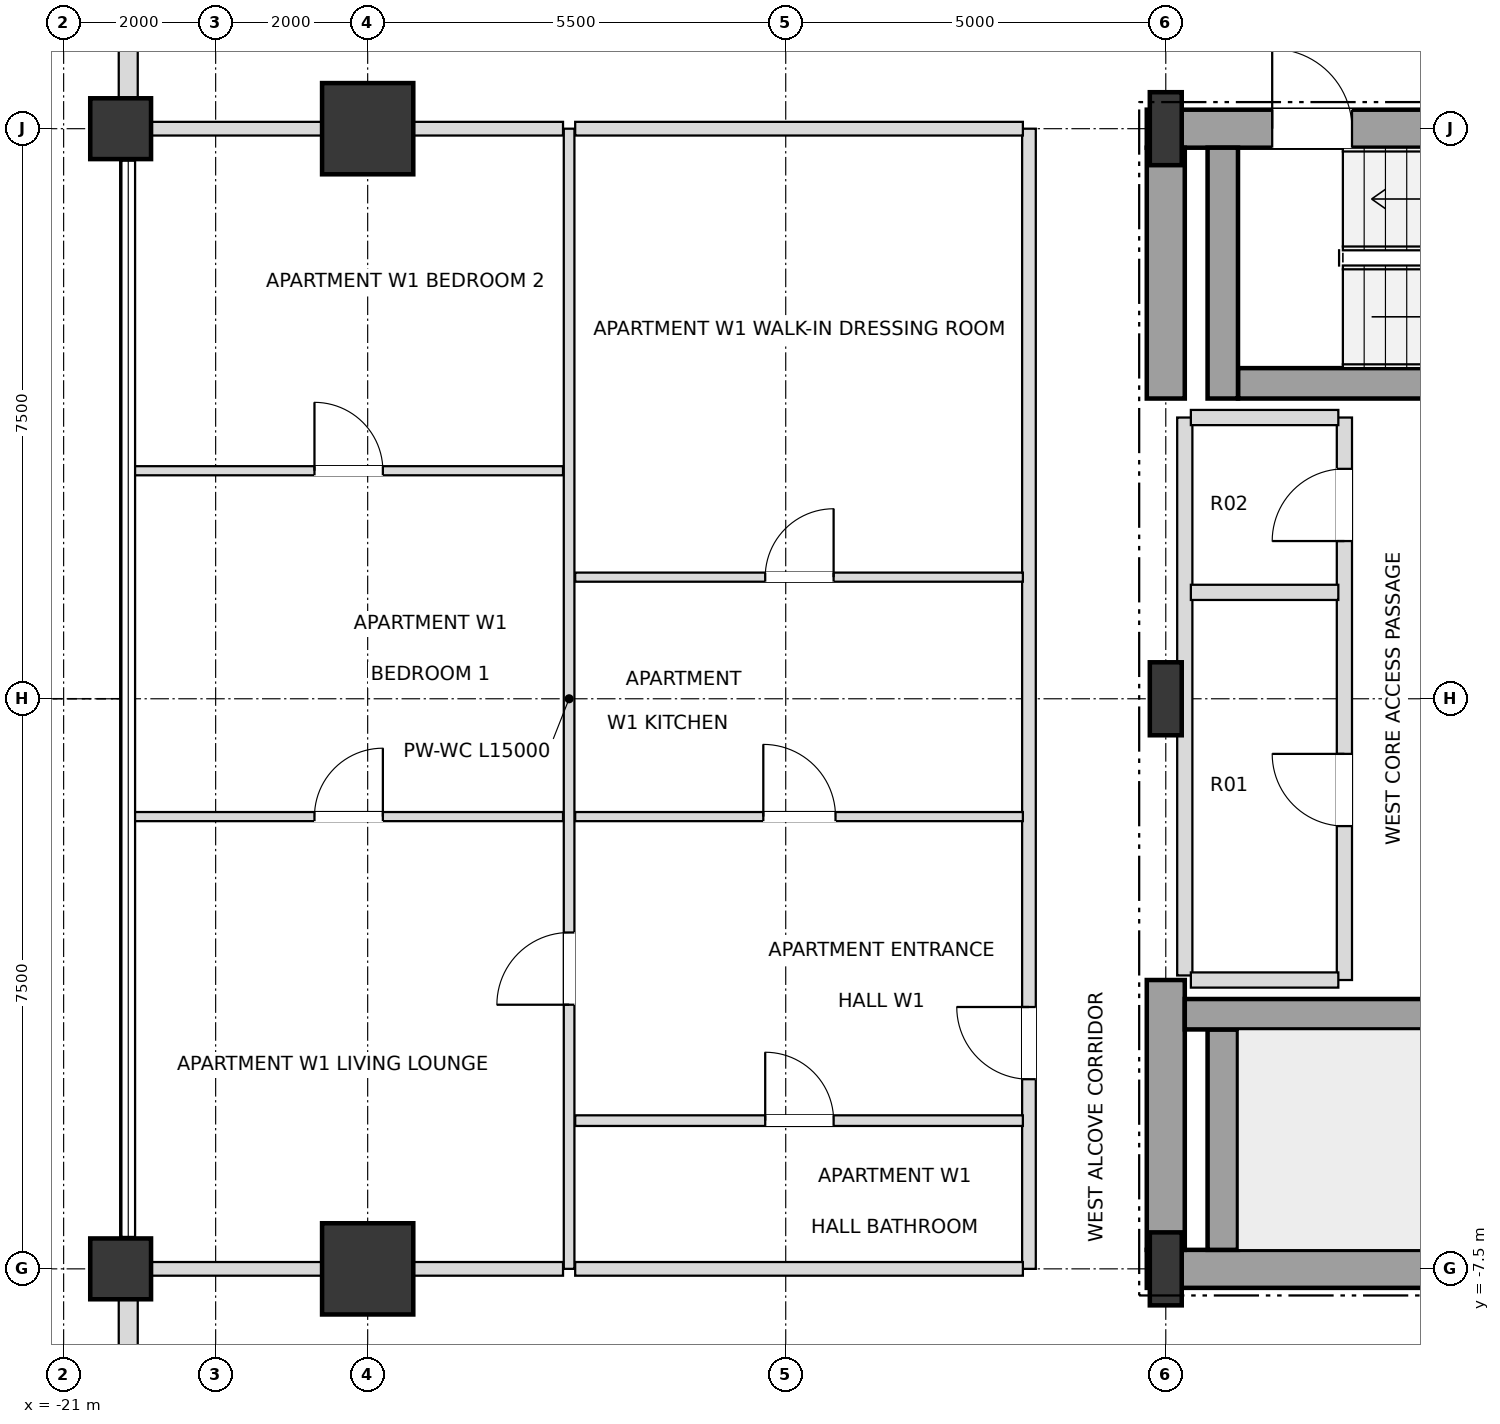
"""IFC4 building model, lengths in metres.
Left out: names, types, materials, properties, quantities, classifications, styles, units other than length and angle.
Written with IfcOpenShell. Run it as: python <this file> out.ifc"""

import sys

from ifc_helpers import new_model, si_unit, direction, frame, frame_2d, origin, origin_2d, place, context, subcontext, project, spatial, rectangle, i_section, extrude, element, fill, save


model = new_model("IFC4")
c1 = context("Model", 3, precision=1e-05, world=origin(), true_north=direction((0.0, 1.0)))
c2 = subcontext(c1, "Body", "Model", "MODEL_VIEW")
j1 = project(units=[si_unit("LENGTHUNIT", "METRE"), si_unit("PLANEANGLEUNIT", "RADIAN")], contexts=[c1])
p1 = place(None, origin())
s1 = spatial("IfcSite", under=j1, at=p1, CompositionType="ELEMENT")
p2 = place(p1, origin())
s2 = spatial("IfcBuilding", under=s1, at=p2, CompositionType="ELEMENT")
p3 = place(p2, frame((0.0, 0.0, 133.2)))
s3 = spatial("IfcBuildingStorey", under=s2, at=p3, CompositionType="ELEMENT", Elevation=133.2)
for number, where, z_axis, x_axis in (
    (1, (-6.5, -7.5, 0.0), (0.0, 0.0, 1.0), (1.0, 0.0, 0.0)),
    (2, (-6.5, 0.0, 0.0), (0.0, 0.0, 1.0), (1.0, 0.0, 0.0)),
    (3, (-6.5, 7.5, 0.0), (0.0, 0.0, 1.0), (1.0, 0.0, 0.0)),
):
    element("IfcColumn", number, at=place(p3, frame(where, z_axis=z_axis, x_axis=x_axis)), inside=s3, PredefinedType="COLUMN", context=c2, shape_type="SweptSolid", body=[
        extrude(i_section(OverallWidth=0.42, OverallDepth=0.96, WebThickness=0.022, FlangeThickness=0.034, at=origin_2d()), origin(), (0.0, 0.0, 1.0), 3.6),
    ])
for number, where, z_axis, x_axis in (
    (4, (-17.0, 7.5, 0.0), (0.0, 0.0, 1.0), (1.0, 0.0, 0.0)),
    (5, (-17.0, -7.5, 0.0), (0.0, 0.0, 1.0), (1.0, 0.0, 0.0)),
):
    element("IfcColumn", number, at=place(p3, frame(where, z_axis=z_axis, x_axis=x_axis)), inside=s3, PredefinedType="USERDEFINED", context=c2, shape_type="SweptSolid", body=[
        extrude(rectangle(XDim=1.2, YDim=1.2, at=origin_2d()), origin(), (0.0, 0.0, 1.0), 3.6),
    ])
for number, where, z_axis, x_axis in (
    (6, (-20.25, -7.5, 0.0), (0.0, 0.0, 1.0), (1.0, 0.0, 0.0)),
    (7, (-20.25, 7.5, 0.0), (0.0, 0.0, 1.0), (1.0, 0.0, 0.0)),
):
    element("IfcColumn", number, at=place(p3, frame(where, z_axis=z_axis, x_axis=x_axis)), inside=s3, PredefinedType="COLUMN", context=c2, shape_type="SweptSolid", body=[
        extrude(rectangle(XDim=0.8, YDim=0.8, at=origin_2d()), origin(), (0.0, 0.0, 1.0), 3.6),
    ])
p4 = place(p3, frame((-20.15, 12.605, 0.0), z_axis=(0.0, 0.0, 1.0), x_axis=(0.0, -1.0, 0.0)))
e8 = element("IfcWall", 8, at=p4, inside=s3, PredefinedType="SOLIDWALL", context=c2, shape_type="SweptSolid", body=[
    extrude(rectangle(XDim=4.71, YDim=0.25, at=frame_2d((2.355, 0.0))), origin(), (0.0, 0.0, 1.0), 2.736),
])
p5 = place(p4, frame((1.455, 0.0, 0.72)))
e9 = element("IfcOpeningElement", 9, at=p5, cuts=e8, PredefinedType="OPENING", context=c2, shape_type="SweptSolid", body=[
    extrude(rectangle(XDim=1.8, YDim=1.68, at=frame_2d((0.9, 0.84))), frame((0.0, 0.135, 0.0), z_axis=(0.0, -1.0, 0.0), x_axis=(1.0, 0.0, 0.0)), (0.0, 0.0, 1.0), 0.27),
])
p6 = place(p3, frame((-20.15, -7.895, 0.0), z_axis=(0.0, 0.0, 1.0), x_axis=(0.0, -1.0, 0.0)))
e10 = element("IfcWall", 10, at=p6, inside=s3, PredefinedType="SOLIDWALL", context=c2, shape_type="SweptSolid", body=[
    extrude(rectangle(XDim=4.71, YDim=0.25, at=frame_2d((2.355, 0.0))), origin(), (0.0, 0.0, 1.0), 2.736),
])
p7 = place(p6, frame((1.455, 0.0, 0.72)))
e11 = element("IfcOpeningElement", 11, at=p7, cuts=e10, PredefinedType="OPENING", context=c2, shape_type="SweptSolid", body=[
    extrude(rectangle(XDim=1.8, YDim=1.68, at=frame_2d((0.9, 0.84))), frame((0.0, 0.135, 0.0), z_axis=(0.0, -1.0, 0.0), x_axis=(1.0, 0.0, 0.0)), (0.0, 0.0, 1.0), 0.27),
])
p8 = place(p3, frame((-6.75, -7.5, 0.0), z_axis=(0.0, 0.0, 1.0), x_axis=(1.0, 0.0, 0.0)))
e12 = element("IfcWall", 12, at=p8, inside=s3, PredefinedType="SHEAR", context=c2, shape_type="SweptSolid", body=[
    extrude(rectangle(XDim=6.75, YDim=0.5, at=frame_2d((3.375, 0.0))), origin(), (0.0, 0.0, 1.0), 3.38),
])
p9 = place(p3, frame((-6.75, 7.5, 0.0), z_axis=(0.0, 0.0, 1.0), x_axis=(1.0, 0.0, 0.0)))
e13 = element("IfcWall", 13, at=p9, inside=s3, PredefinedType="SHEAR", context=c2, shape_type="SweptSolid", body=[
    extrude(rectangle(XDim=6.75, YDim=0.5, at=frame_2d((3.375, 0.0))), origin(), (0.0, 0.0, 1.0), 3.38),
])
p10 = place(p9, frame((1.65, 0.0, 0.0)))
e14 = element("IfcOpeningElement", 14, at=p10, cuts=e13, PredefinedType="OPENING", context=c2, shape_type="SweptSolid", body=[
    extrude(rectangle(XDim=1.05, YDim=2.15, at=frame_2d((0.525, 1.075))), frame((0.0, 0.26, 0.0), z_axis=(0.0, -1.0, 0.0), x_axis=(1.0, 0.0, 0.0)), (0.0, 0.0, 1.0), 0.52),
])
p11 = place(p3, frame((-6.5, -7.25, 0.0), z_axis=(0.0, 0.0, 1.0), x_axis=(0.0, 1.0, 0.0)))
e15 = element("IfcWall", 15, at=p11, inside=s3, PredefinedType="SHEAR", context=c2, shape_type="SweptSolid", body=[
    extrude(rectangle(XDim=3.55, YDim=0.5, at=frame_2d((1.775, 0.0))), origin(), (0.0, 0.0, 1.0), 3.38),
])
p12 = place(p3, frame((-6.5, 3.95, 0.0), z_axis=(0.0, 0.0, 1.0), x_axis=(0.0, 1.0, 0.0)))
e16 = element("IfcWall", 16, at=p12, inside=s3, PredefinedType="SHEAR", context=c2, shape_type="SweptSolid", body=[
    extrude(rectangle(XDim=3.3, YDim=0.5, at=frame_2d((1.65, 0.0))), origin(), (0.0, 0.0, 1.0), 3.38),
])
p13 = place(p3, frame((-5.75, -7.25, 0.0), z_axis=(0.0, 0.0, 1.0), x_axis=(0.0, 1.0, 0.0)))
e17 = element("IfcWall", 17, at=p13, inside=s3, PredefinedType="SHEAR", context=c2, shape_type="SweptSolid", body=[
    extrude(rectangle(XDim=2.9, YDim=0.4, at=frame_2d((1.45, 0.0))), origin(), (0.0, 0.0, 1.0), 3.38),
])
p14 = place(p3, frame((-6.25, -4.15, 0.0), z_axis=(0.0, 0.0, 1.0), x_axis=(1.0, 0.0, 0.0)))
e18 = element("IfcWall", 18, at=p14, inside=s3, PredefinedType="SHEAR", context=c2, shape_type="SweptSolid", body=[
    extrude(rectangle(XDim=7.78, YDim=0.4, at=frame_2d((3.89, 0.0))), origin(), (0.0, 0.0, 1.0), 3.38),
])
p15 = place(p3, frame((-5.55, 4.15, 0.0), z_axis=(0.0, 0.0, 1.0), x_axis=(1.0, 0.0, 0.0)))
e19 = element("IfcWall", 19, at=p15, inside=s3, PredefinedType="SHEAR", context=c2, shape_type="SweptSolid", body=[
    extrude(rectangle(XDim=7.08, YDim=0.4, at=frame_2d((3.54, 0.0))), origin(), (0.0, 0.0, 1.0), 3.38),
])
p16 = place(p3, frame((-5.75, 3.95, 0.0), z_axis=(0.0, 0.0, 1.0), x_axis=(0.0, 1.0, 0.0)))
e20 = element("IfcWall", 20, at=p16, inside=s3, PredefinedType="SHEAR", context=c2, shape_type="SweptSolid", body=[
    extrude(rectangle(XDim=3.3, YDim=0.4, at=frame_2d((1.65, 0.0))), origin(), (0.0, 0.0, 1.0), 3.38),
])
p17 = place(p3, frame((-14.35, -7.5, 0.0), z_axis=(0.0, 0.0, 1.0), x_axis=(0.0, 1.0, 0.0)))
e21 = element("IfcWall", 21, at=p17, inside=s3, PredefinedType="PARTITIONING", context=c2, shape_type="SweptSolid", body=[
    extrude(rectangle(XDim=15.0, YDim=0.14, at=frame_2d((7.5, 0.0))), origin(), (0.0, 0.0, 1.0), 3.38),
])
p18 = place(p17, frame((3.475, 0.0, 0.0)))
e22 = element("IfcOpeningElement", 22, at=p18, cuts=e21, PredefinedType="OPENING", context=c2, shape_type="SweptSolid", body=[
    extrude(rectangle(XDim=0.95, YDim=2.1, at=frame_2d((0.475, 1.05))), frame((0.0, 0.08, 0.0), z_axis=(0.0, -1.0, 0.0), x_axis=(1.0, 0.0, 0.0)), (0.0, 0.0, 1.0), 0.16),
])
p19 = place(p3, frame((-8.3, -7.5, 0.0), z_axis=(0.0, 0.0, 1.0), x_axis=(0.0, 1.0, 0.0)))
e23 = element("IfcWall", 23, at=p19, inside=s3, PredefinedType="PARTITIONING", context=c2, shape_type="SweptSolid", body=[
    extrude(rectangle(XDim=15.0, YDim=0.18, at=frame_2d((7.5, 0.0))), origin(), (0.0, 0.0, 1.0), 3.38),
])
p20 = place(p19, frame((2.495, 0.0, 0.0)))
e24 = element("IfcOpeningElement", 24, at=p20, cuts=e23, PredefinedType="OPENING", context=c2, shape_type="SweptSolid", body=[
    extrude(rectangle(XDim=0.95, YDim=2.15, at=frame_2d((0.475, 1.075))), frame((0.0, 0.1, 0.0), z_axis=(0.0, -1.0, 0.0), x_axis=(1.0, 0.0, 0.0)), (0.0, 0.0, 1.0), 0.2),
])
p21 = place(p3, frame((-6.25, -3.64, 0.0), z_axis=(0.0, 0.0, 1.0), x_axis=(0.0, 1.0, 0.0)))
e25 = element("IfcWall", 25, at=p21, inside=s3, PredefinedType="SOLIDWALL", context=c2, shape_type="SweptSolid", body=[
    extrude(rectangle(XDim=7.34, YDim=0.2, at=frame_2d((3.67, 0.0))), origin(), (0.0, 0.0, 1.0), 3.38),
])
p22 = place(p3, frame((-4.15, -3.7, 0.0), z_axis=(0.0, 0.0, 1.0), x_axis=(0.0, 1.0, 0.0)))
e26 = element("IfcWall", 26, at=p22, inside=s3, PredefinedType="SOLIDWALL", context=c2, shape_type="SweptSolid", body=[
    extrude(rectangle(XDim=7.4, YDim=0.2, at=frame_2d((3.7, 0.0))), origin(), (0.0, 0.0, 1.0), 3.38),
])
p23 = place(p22, frame((2.025, 0.0, 0.0)))
e27 = element("IfcOpeningElement", 27, at=p23, cuts=e26, PredefinedType="OPENING", context=c2, shape_type="SweptSolid", body=[
    extrude(rectangle(XDim=0.95, YDim=2.15, at=frame_2d((0.475, 1.075))), frame((0.0, 0.11, 0.0), z_axis=(0.0, -1.0, 0.0), x_axis=(1.0, 0.0, 0.0)), (0.0, 0.0, 1.0), 0.22),
])
p24 = place(p22, frame((5.775, 0.0, 0.0)))
e28 = element("IfcOpeningElement", 28, at=p24, cuts=e26, PredefinedType="OPENING", context=c2, shape_type="SweptSolid", body=[
    extrude(rectangle(XDim=0.95, YDim=2.15, at=frame_2d((0.475, 1.075))), frame((0.0, 0.11, 0.0), z_axis=(0.0, -1.0, 0.0), x_axis=(1.0, 0.0, 0.0)), (0.0, 0.0, 1.0), 0.22),
])
p25 = place(p3, frame((-20.15, -7.5, 0.0), z_axis=(0.0, 0.0, 1.0), x_axis=(1.0, 0.0, 0.0)))
e29 = element("IfcWall", 29, at=p25, inside=s3, PredefinedType="PARTITIONING", context=c2, shape_type="SweptSolid", body=[
    extrude(rectangle(XDim=5.72, YDim=0.18, at=frame_2d((2.86, 0.0))), origin(), (0.0, 0.0, 1.0), 2.816),
])
p26 = place(p3, frame((-14.27, -7.5, 0.0), z_axis=(0.0, 0.0, 1.0), x_axis=(1.0, 0.0, 0.0)))
e30 = element("IfcWall", 30, at=p26, inside=s3, PredefinedType="PARTITIONING", context=c2, shape_type="SweptSolid", body=[
    extrude(rectangle(XDim=5.89, YDim=0.18, at=frame_2d((2.945, 0.0))), origin(), (0.0, 0.0, 1.0), 2.816),
])
p27 = place(p3, frame((-14.27, -5.55, 0.0), z_axis=(0.0, 0.0, 1.0), x_axis=(1.0, 0.0, 0.0)))
e31 = element("IfcWall", 31, at=p27, inside=s3, PredefinedType="PARTITIONING", context=c2, shape_type="SweptSolid", body=[
    extrude(rectangle(XDim=5.89, YDim=0.14, at=frame_2d((2.945, 0.0))), origin(), (0.0, 0.0, 1.0), 3.38),
])
p28 = place(p27, frame((2.5, 0.0, 0.0)))
e32 = element("IfcOpeningElement", 32, at=p28, cuts=e31, PredefinedType="OPENING", context=c2, shape_type="SweptSolid", body=[
    extrude(rectangle(XDim=0.9, YDim=2.1, at=frame_2d((0.45, 1.05))), frame((0.0, 0.08, 0.0), z_axis=(0.0, -1.0, 0.0), x_axis=(1.0, 0.0, 0.0)), (0.0, 0.0, 1.0), 0.16),
])
p29 = place(p3, frame((-6.17, -3.7, 0.0), z_axis=(0.0, 0.0, 1.0), x_axis=(1.0, 0.0, 0.0)))
e33 = element("IfcWall", 33, at=p29, inside=s3, PredefinedType="SOLIDWALL", context=c2, shape_type="SweptSolid", body=[
    extrude(rectangle(XDim=1.94, YDim=0.2, at=frame_2d((0.97, 0.0))), origin(), (0.0, 0.0, 1.0), 3.38),
])
p30 = place(p3, frame((-20.07, -1.55, 0.0), z_axis=(0.0, 0.0, 1.0), x_axis=(1.0, 0.0, 0.0)))
e34 = element("IfcWall", 34, at=p30, inside=s3, PredefinedType="PARTITIONING", context=c2, shape_type="SweptSolid", body=[
    extrude(rectangle(XDim=5.64, YDim=0.12, at=frame_2d((2.82, 0.0))), origin(), (0.0, 0.0, 1.0), 2.816),
])
p31 = place(p30, frame((2.37, 0.0, 0.0)))
e35 = element("IfcOpeningElement", 35, at=p31, cuts=e34, PredefinedType="OPENING", context=c2, shape_type="SweptSolid", body=[
    extrude(rectangle(XDim=0.9, YDim=2.1, at=frame_2d((0.45, 1.05))), frame((0.0, 0.07, 0.0), z_axis=(0.0, -1.0, 0.0), x_axis=(1.0, 0.0, 0.0)), (0.0, 0.0, 1.0), 0.14),
])
p32 = place(p3, frame((-14.27, -1.55, 0.0), z_axis=(0.0, 0.0, 1.0), x_axis=(1.0, 0.0, 0.0)))
e36 = element("IfcWall", 36, at=p32, inside=s3, PredefinedType="PARTITIONING", context=c2, shape_type="SweptSolid", body=[
    extrude(rectangle(XDim=5.89, YDim=0.12, at=frame_2d((2.945, 0.0))), origin(), (0.0, 0.0, 1.0), 3.38),
])
p33 = place(p32, frame((2.475, 0.0, 0.0)))
e37 = element("IfcOpeningElement", 37, at=p33, cuts=e36, PredefinedType="OPENING", context=c2, shape_type="SweptSolid", body=[
    extrude(rectangle(XDim=0.95, YDim=2.1, at=frame_2d((0.475, 1.05))), frame((0.0, 0.07, 0.0), z_axis=(0.0, -1.0, 0.0), x_axis=(1.0, 0.0, 0.0)), (0.0, 0.0, 1.0), 0.14),
])
p34 = place(p3, frame((-6.17, 1.4, 0.0), z_axis=(0.0, 0.0, 1.0), x_axis=(1.0, 0.0, 0.0)))
e38 = element("IfcWall", 38, at=p34, inside=s3, PredefinedType="SOLIDWALL", context=c2, shape_type="SweptSolid", body=[
    extrude(rectangle(XDim=1.94, YDim=0.2, at=frame_2d((0.97, 0.0))), origin(), (0.0, 0.0, 1.0), 3.38),
])
p35 = place(p3, frame((-14.27, 1.6, 0.0), z_axis=(0.0, 0.0, 1.0), x_axis=(1.0, 0.0, 0.0)))
e39 = element("IfcWall", 39, at=p35, inside=s3, PredefinedType="PARTITIONING", context=c2, shape_type="SweptSolid", body=[
    extrude(rectangle(XDim=5.89, YDim=0.12, at=frame_2d((2.945, 0.0))), origin(), (0.0, 0.0, 1.0), 3.38),
])
p36 = place(p35, frame((2.5, 0.0, 0.0)))
e40 = element("IfcOpeningElement", 40, at=p36, cuts=e39, PredefinedType="OPENING", context=c2, shape_type="SweptSolid", body=[
    extrude(rectangle(XDim=0.9, YDim=2.1, at=frame_2d((0.45, 1.05))), frame((0.0, 0.07, 0.0), z_axis=(0.0, -1.0, 0.0), x_axis=(1.0, 0.0, 0.0)), (0.0, 0.0, 1.0), 0.14),
])
p37 = place(p3, frame((-20.07, 3.0, 0.0), z_axis=(0.0, 0.0, 1.0), x_axis=(1.0, 0.0, 0.0)))
e41 = element("IfcWall", 41, at=p37, inside=s3, PredefinedType="PARTITIONING", context=c2, shape_type="SweptSolid", body=[
    extrude(rectangle(XDim=5.64, YDim=0.12, at=frame_2d((2.82, 0.0))), origin(), (0.0, 0.0, 1.0), 2.816),
])
p38 = place(p37, frame((2.37, 0.0, 0.0)))
e42 = element("IfcOpeningElement", 42, at=p38, cuts=e41, PredefinedType="OPENING", context=c2, shape_type="SweptSolid", body=[
    extrude(rectangle(XDim=0.9, YDim=2.1, at=frame_2d((0.45, 1.05))), frame((0.0, 0.07, 0.0), z_axis=(0.0, -1.0, 0.0), x_axis=(1.0, 0.0, 0.0)), (0.0, 0.0, 1.0), 0.14),
])
p39 = place(p3, frame((-6.17, 3.7, 0.0), z_axis=(0.0, 0.0, 1.0), x_axis=(1.0, 0.0, 0.0)))
e43 = element("IfcWall", 43, at=p39, inside=s3, PredefinedType="SOLIDWALL", context=c2, shape_type="SweptSolid", body=[
    extrude(rectangle(XDim=1.94, YDim=0.2, at=frame_2d((0.97, 0.0))), origin(), (0.0, 0.0, 1.0), 3.38),
])
p40 = place(p3, frame((-20.15, 7.5, 0.0), z_axis=(0.0, 0.0, 1.0), x_axis=(1.0, 0.0, 0.0)))
e44 = element("IfcWall", 44, at=p40, inside=s3, PredefinedType="PARTITIONING", context=c2, shape_type="SweptSolid", body=[
    extrude(rectangle(XDim=5.72, YDim=0.18, at=frame_2d((2.86, 0.0))), origin(), (0.0, 0.0, 1.0), 2.816),
])
p41 = place(p3, frame((-14.27, 7.5, 0.0), z_axis=(0.0, 0.0, 1.0), x_axis=(1.0, 0.0, 0.0)))
e45 = element("IfcWall", 45, at=p41, inside=s3, PredefinedType="PARTITIONING", context=c2, shape_type="SweptSolid", body=[
    extrude(rectangle(XDim=5.89, YDim=0.18, at=frame_2d((2.945, 0.0))), origin(), (0.0, 0.0, 1.0), 2.816),
])
p42 = place(p10, origin())
e46 = element("IfcDoor", 46, at=p42, inside=s3, OperationType="SINGLE_SWING_LEFT", PredefinedType="DOOR", context=c2, shape_type="SweptSolid", body=[
    extrude(rectangle(XDim=1.05, YDim=2.15, at=frame_2d((0.525, 1.075))), frame((0.0, 0.025, 0.0), z_axis=(0.0, -1.0, 0.0), x_axis=(1.0, 0.0, 0.0)), (0.0, 0.0, 1.0), 0.05),
])
fill(e14, e46)
p43 = place(p23, origin())
e47 = element("IfcDoor", 47, at=p43, inside=s3, OperationType="SINGLE_SWING_RIGHT", PredefinedType="DOOR", context=c2, shape_type="SweptSolid", body=[
    extrude(rectangle(XDim=0.95, YDim=2.15, at=frame_2d((0.475, 1.075))), frame((0.0, 0.025, 0.0), z_axis=(0.0, -1.0, 0.0), x_axis=(1.0, 0.0, 0.0)), (0.0, 0.0, 1.0), 0.05),
])
fill(e27, e47)
p44 = place(p24, origin())
e48 = element("IfcDoor", 48, at=p44, inside=s3, OperationType="SINGLE_SWING_LEFT", PredefinedType="DOOR", context=c2, shape_type="SweptSolid", body=[
    extrude(rectangle(XDim=0.95, YDim=2.15, at=frame_2d((0.475, 1.075))), frame((0.0, 0.025, 0.0), z_axis=(0.0, -1.0, 0.0), x_axis=(1.0, 0.0, 0.0)), (0.0, 0.0, 1.0), 0.05),
])
fill(e28, e48)
p45 = place(p28, origin())
e49 = element("IfcDoor", 49, at=p45, inside=s3, OperationType="SINGLE_SWING_LEFT", PredefinedType="DOOR", context=c2, shape_type="SweptSolid", body=[
    extrude(rectangle(XDim=0.9, YDim=2.1, at=frame_2d((0.45, 1.05))), frame((0.0, 0.025, 0.0), z_axis=(0.0, -1.0, 0.0), x_axis=(1.0, 0.0, 0.0)), (0.0, 0.0, 1.0), 0.05),
])
fill(e32, e49)
p46 = place(p20, origin())
e50 = element("IfcDoor", 50, at=p46, inside=s3, OperationType="SINGLE_SWING_RIGHT", PredefinedType="DOOR", context=c2, shape_type="SweptSolid", body=[
    extrude(rectangle(XDim=0.95, YDim=2.15, at=frame_2d((0.475, 1.075))), frame((0.0, 0.025, 0.0), z_axis=(0.0, -1.0, 0.0), x_axis=(1.0, 0.0, 0.0)), (0.0, 0.0, 1.0), 0.05),
])
fill(e24, e50)
p47 = place(p33, origin())
e51 = element("IfcDoor", 51, at=p47, inside=s3, OperationType="SINGLE_SWING_LEFT", PredefinedType="DOOR", context=c2, shape_type="SweptSolid", body=[
    extrude(rectangle(XDim=0.95, YDim=2.1, at=frame_2d((0.475, 1.05))), frame((0.0, 0.025, 0.0), z_axis=(0.0, -1.0, 0.0), x_axis=(1.0, 0.0, 0.0)), (0.0, 0.0, 1.0), 0.05),
])
fill(e37, e51)
p48 = place(p36, origin())
e52 = element("IfcDoor", 52, at=p48, inside=s3, OperationType="SINGLE_SWING_RIGHT", PredefinedType="DOOR", context=c2, shape_type="SweptSolid", body=[
    extrude(rectangle(XDim=0.9, YDim=2.1, at=frame_2d((0.45, 1.05))), frame((0.0, 0.025, 0.0), z_axis=(0.0, -1.0, 0.0), x_axis=(1.0, 0.0, 0.0)), (0.0, 0.0, 1.0), 0.05),
])
fill(e40, e52)
p49 = place(p18, origin())
e53 = element("IfcDoor", 53, at=p49, inside=s3, OperationType="SINGLE_SWING_LEFT", PredefinedType="DOOR", context=c2, shape_type="SweptSolid", body=[
    extrude(rectangle(XDim=0.95, YDim=2.1, at=frame_2d((0.475, 1.05))), frame((0.0, 0.025, 0.0), z_axis=(0.0, -1.0, 0.0), x_axis=(1.0, 0.0, 0.0)), (0.0, 0.0, 1.0), 0.05),
])
fill(e22, e53)
p50 = place(p31, origin())
e54 = element("IfcDoor", 54, at=p50, inside=s3, OperationType="SINGLE_SWING_RIGHT", PredefinedType="DOOR", context=c2, shape_type="SweptSolid", body=[
    extrude(rectangle(XDim=0.9, YDim=2.1, at=frame_2d((0.45, 1.05))), frame((0.0, 0.025, 0.0), z_axis=(0.0, -1.0, 0.0), x_axis=(1.0, 0.0, 0.0)), (0.0, 0.0, 1.0), 0.05),
])
fill(e35, e54)
p51 = place(p38, origin())
e55 = element("IfcDoor", 55, at=p51, inside=s3, OperationType="SINGLE_SWING_LEFT", PredefinedType="DOOR", context=c2, shape_type="SweptSolid", body=[
    extrude(rectangle(XDim=0.9, YDim=2.1, at=frame_2d((0.45, 1.05))), frame((0.0, 0.025, 0.0), z_axis=(0.0, -1.0, 0.0), x_axis=(1.0, 0.0, 0.0)), (0.0, 0.0, 1.0), 0.05),
])
fill(e42, e55)
save(model, sys.argv[1])
